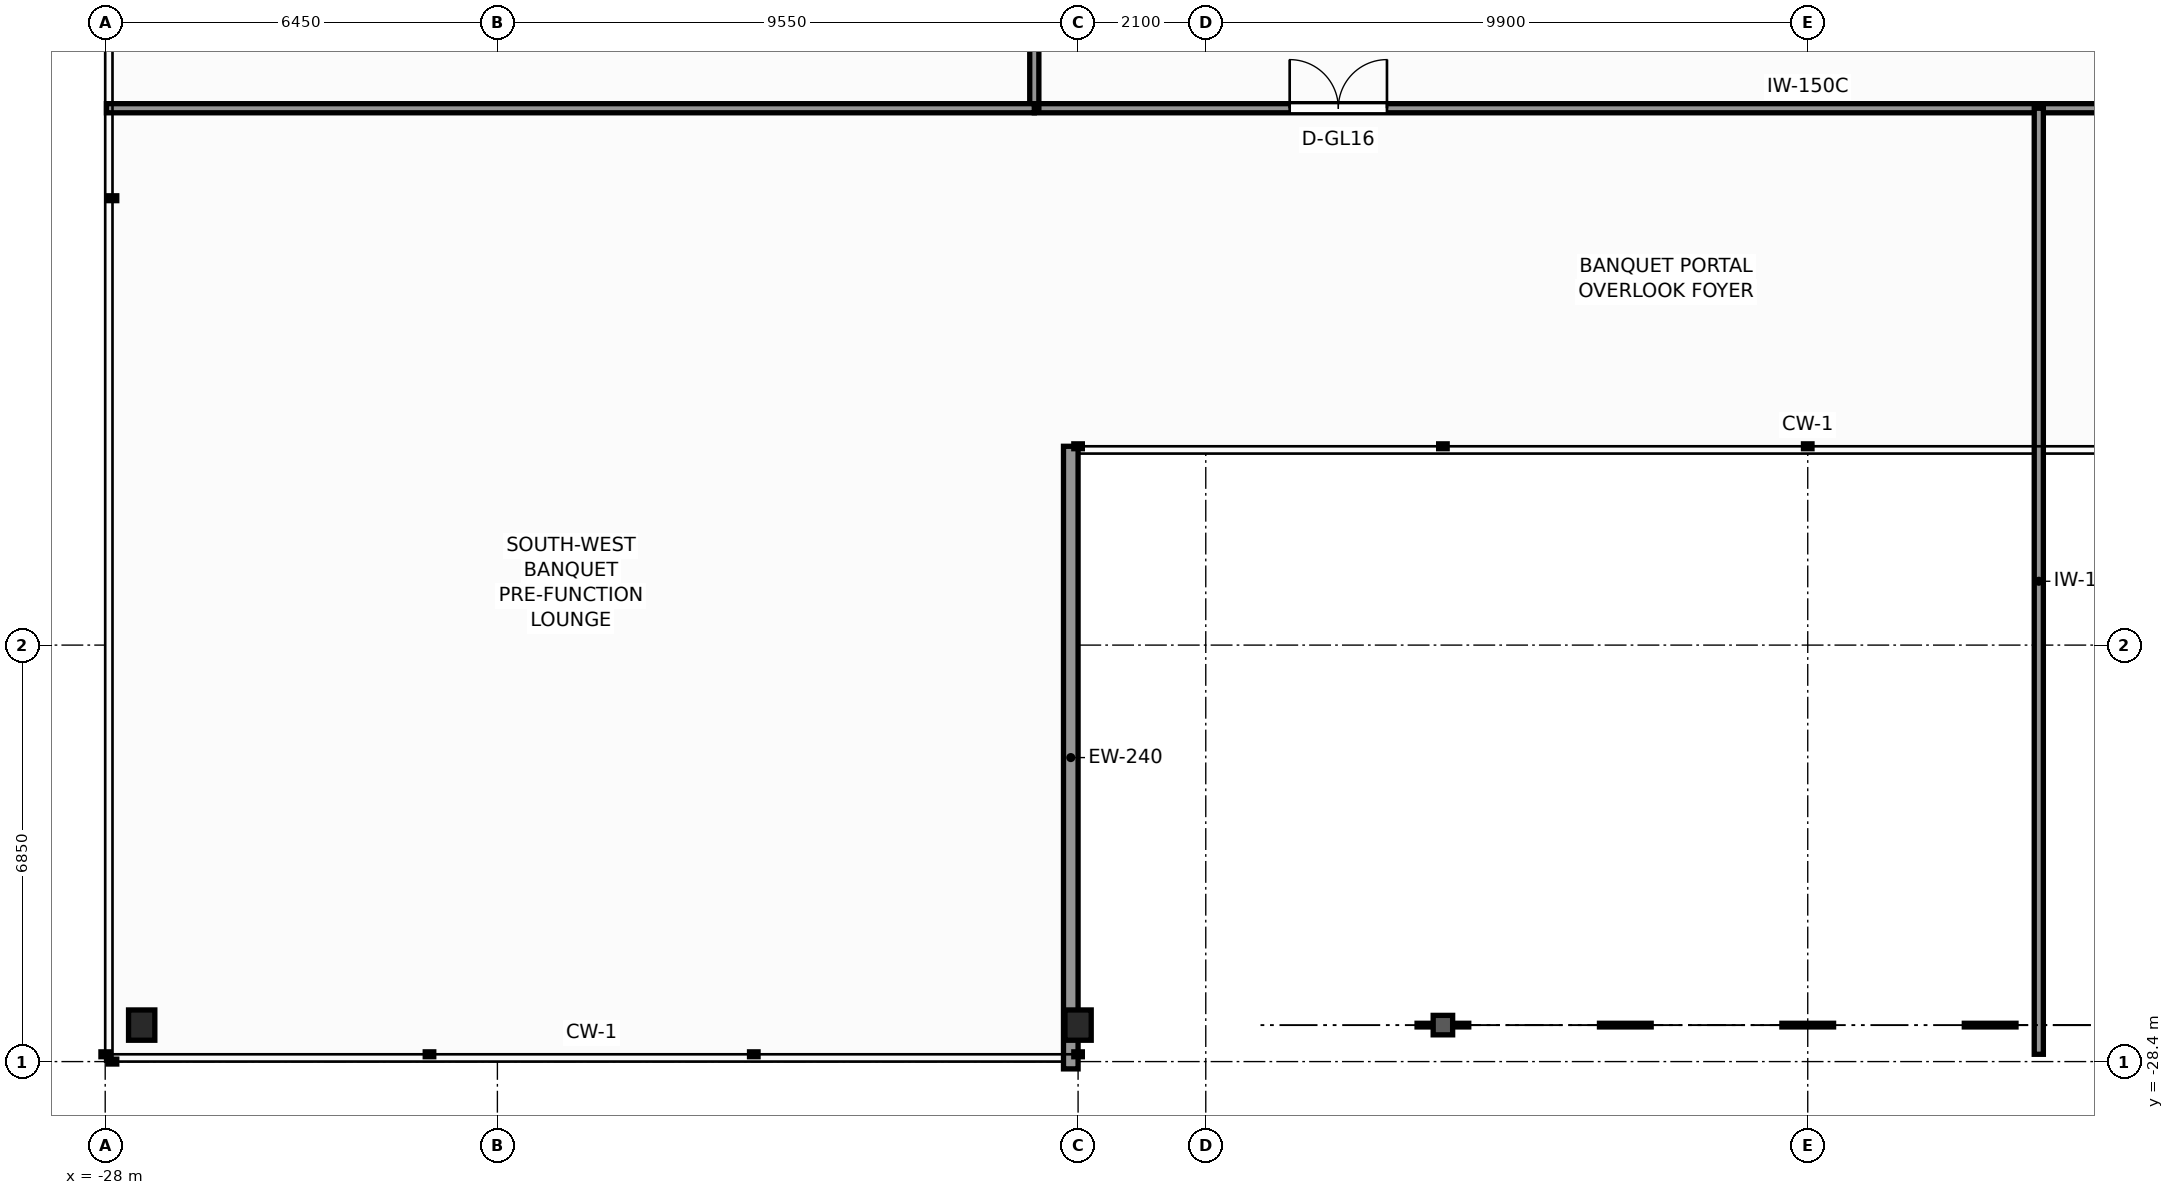
"""IFC4 building model, lengths in metres.
Left out: names, types, materials, properties, quantities, classifications, styles, units other than length and angle.
Written with IfcOpenShell. Run it as: python <this file> out.ifc"""

import sys

from ifc_helpers import new_model, si_unit, direction, frame, frame_2d, origin, origin_2d, place, context, subcontext, project, spatial, rectangle, i_section, extrude, element, fill, save


model = new_model("IFC4")
c1 = context("Model", 3, precision=1e-05, world=origin(), true_north=direction((0.0, 1.0)))
c2 = subcontext(c1, "Body", "Model", "MODEL_VIEW")
j1 = project(units=[si_unit("LENGTHUNIT", "METRE"), si_unit("PLANEANGLEUNIT", "RADIAN")], contexts=[c1])
p1 = place(None, origin())
s1 = spatial("IfcSite", under=j1, at=p1, CompositionType="ELEMENT")
p2 = place(p1, origin())
s2 = spatial("IfcBuilding", under=s1, at=p2, CompositionType="ELEMENT")
p3 = place(p2, frame((0.0, 0.0, 10.0)))
s3 = spatial("IfcBuildingStorey", under=s2, at=p3, CompositionType="ELEMENT", Elevation=10.0)
for number, where, z_axis, x_axis in (
    (1, (-27.4, -27.8, 0.0), (0.0, 0.0, 1.0), (1.0, 0.0, 0.0)),
    (2, (-12.0, -27.8, 0.0), (0.0, 0.0, 1.0), (1.0, 0.0, 0.0)),
):
    element("IfcColumn", number, at=place(p3, frame(where, z_axis=z_axis, x_axis=x_axis)), inside=s3, PredefinedType="COLUMN", context=c2, shape_type="SweptSolid", body=[
        extrude(i_section(OverallWidth=0.432, OverallDepth=0.498, WebThickness=0.056, FlangeThickness=0.089, FilletRadius=0.025, at=origin_2d()), origin(), (0.0, 0.0, 1.0), 5.2),
    ])
p4 = place(p3, frame((-12.12, -18.28, 0.0), z_axis=(0.0, 0.0, 1.0), x_axis=(0.0, -1.0, 0.0)))
e3 = element("IfcWall", 3, at=p4, inside=s3, PredefinedType="STANDARD", context=c2, shape_type="SweptSolid", body=[
    extrude(rectangle(XDim=10.24, YDim=0.24, at=frame_2d((5.12, 0.0))), origin(), (0.0, 0.0, 1.0), 3.904),
])
p5 = place(p3, frame((-12.72, -12.72, 0.0), z_axis=(0.0, 0.0, 1.0), x_axis=(1.0, 0.0, 0.0)))
e4 = element("IfcWall", 4, at=p5, inside=s3, PredefinedType="PARTITIONING", context=c2, shape_type="SweptSolid", body=[
    extrude(rectangle(XDim=25.44, YDim=0.15, at=frame_2d((12.72, 0.0))), origin(), (0.0, 0.0, 1.0), 3.894),
])
p6 = place(p5, frame((4.2, 0.0, 0.0)))
e5 = element("IfcOpeningElement", 5, at=p6, cuts=e4, PredefinedType="OPENING", context=c2, shape_type="SweptSolid", body=[
    extrude(rectangle(XDim=1.6, YDim=2.3, at=frame_2d((0.8, 1.15))), frame((0.0, 0.085, 0.0), z_axis=(0.0, -1.0, 0.0), x_axis=(1.0, 0.0, 0.0)), (0.0, 0.0, 1.0), 0.17),
])
p7 = place(p5, frame((18.2, 0.0, 0.0)))
e6 = element("IfcOpeningElement", 6, at=p7, cuts=e4, PredefinedType="OPENING", context=c2, shape_type="SweptSolid", body=[
    extrude(rectangle(XDim=0.95, YDim=2.06, at=frame_2d((0.475, 1.03))), frame((0.0, 0.085, 0.0), z_axis=(0.0, -1.0, 0.0), x_axis=(1.0, 0.0, 0.0)), (0.0, 0.0, 1.0), 0.17),
])
p8 = place(p3, frame((-12.72, -12.72, 0.0), z_axis=(0.0, 0.0, 1.0), x_axis=(0.0, 1.0, 0.0)))
e7 = element("IfcWall", 7, at=p8, inside=s3, PredefinedType="PARTITIONING", context=c2, shape_type="SweptSolid", body=[
    extrude(rectangle(XDim=12.42, YDim=0.15, at=frame_2d((6.21, 0.0))), origin(), (0.0, 0.0, 1.0), 3.894),
])
p9 = place(p8, frame((4.5, 0.0, 0.0)))
e8 = element("IfcOpeningElement", 8, at=p9, cuts=e7, PredefinedType="OPENING", context=c2, shape_type="SweptSolid", body=[
    extrude(rectangle(XDim=1.6, YDim=2.3, at=frame_2d((0.8, 1.15))), frame((0.0, 0.085, 0.0), z_axis=(0.0, -1.0, 0.0), x_axis=(1.0, 0.0, 0.0)), (0.0, 0.0, 1.0), 0.17),
])
p10 = place(p3, frame((-27.98, -12.72, 0.0), z_axis=(0.0, 0.0, 1.0), x_axis=(1.0, 0.0, 0.0)))
e9 = element("IfcWall", 9, at=p10, inside=s3, PredefinedType="PARTITIONING", context=c2, shape_type="SweptSolid", body=[
    extrude(rectangle(XDim=15.26, YDim=0.15, at=frame_2d((7.63, 0.0))), origin(), (0.0, 0.0, 1.0), 4.289),
])
p11 = place(p3, frame((3.8, -28.28, 0.0), z_axis=(0.0, 0.0, 1.0), x_axis=(0.0, 1.0, 0.0)))
e10 = element("IfcWall", 10, at=p11, inside=s3, PredefinedType="PARTITIONING", context=c2, shape_type="SweptSolid", body=[
    extrude(rectangle(XDim=15.56, YDim=0.15, at=frame_2d((7.78, 0.0))), origin(), (0.0, 0.0, 1.0), 3.957),
])
p12 = place(p6, origin())
e11 = element("IfcDoor", 11, at=p12, inside=s3, OperationType="DOUBLE_DOOR_SINGLE_SWING", PredefinedType="DOOR", context=c2, shape_type="SweptSolid", body=[
    extrude(rectangle(XDim=1.6, YDim=2.3, at=frame_2d((0.8, 1.15))), frame((0.0, 0.025, 0.0), z_axis=(0.0, -1.0, 0.0), x_axis=(1.0, 0.0, 0.0)), (0.0, 0.0, 1.0), 0.05),
])
fill(e5, e11)
save(model, sys.argv[1])
